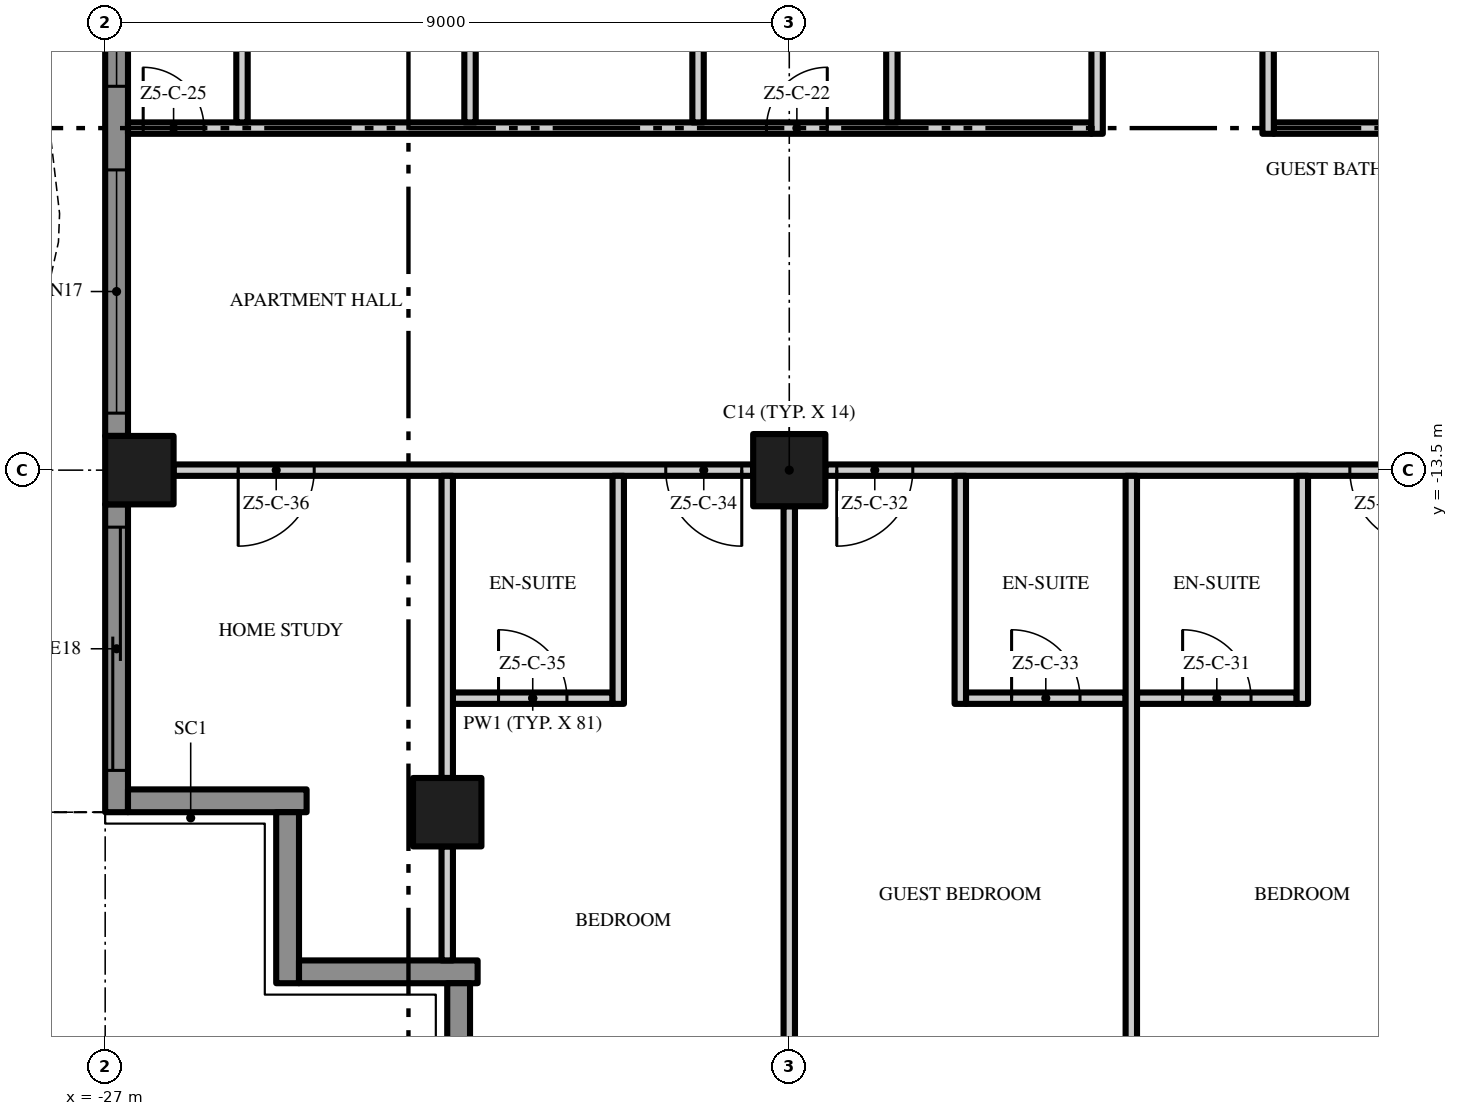
"""IFC4 building model, lengths in metres.
Left out: names, types, materials, properties, quantities, classifications, styles, units other than length and angle.
Written with IfcOpenShell. Run it as: python <this file> out.ifc"""

import sys

from ifc_helpers import new_model, si_unit, direction, frame, frame_2d, origin, origin_2d, place, context, subcontext, project, spatial, polyline, rectangle, outline, extrude, element, fill, save


model = new_model("IFC4")
c1 = context("Model", 3, precision=1e-05, world=origin(), true_north=direction((0.0, 1.0)))
c2 = subcontext(c1, "Body", "Model", "MODEL_VIEW")
j1 = project(units=[si_unit("LENGTHUNIT", "METRE"), si_unit("PLANEANGLEUNIT", "RADIAN")], contexts=[c1])
p1 = place(None, origin())
s1 = spatial("IfcSite", under=j1, at=p1, CompositionType="ELEMENT")
p2 = place(p1, origin())
s2 = spatial("IfcBuilding", under=s1, at=p2, CompositionType="ELEMENT")
p3 = place(p2, frame((0.0, 0.0, 269.2)))
s3 = spatial("IfcBuildingStorey", under=s2, at=p3, CompositionType="ELEMENT", Elevation=269.2)
p4 = place(p3, frame((-18.0, -13.5, 0.0), z_axis=(0.0, 0.0, 1.0), x_axis=(1.0, 0.0, 0.0)))
e1 = element("IfcColumn", 1, at=p4, inside=s3, PredefinedType="COLUMN", context=c2, shape_type="SweptSolid", body=[
    extrude(rectangle(XDim=0.95, YDim=0.95, at=origin_2d()), origin(), (0.0, 0.0, 1.0), 3.5),
])
for number, where, z_axis, x_axis in (
    (2, (-26.55, -13.5, 0.0), (0.0, 0.0, 1.0), (1.0, 0.0, 0.0)),
    (3, (-22.5, -18.0, 0.0), (0.0, 0.0, 1.0), (1.0, 0.0, 0.0)),
):
    element("IfcColumn", number, at=place(p3, frame(where, z_axis=z_axis, x_axis=x_axis)), inside=s3, PredefinedType="COLUMN", context=c2, shape_type="SweptSolid", body=[
        extrude(rectangle(XDim=0.9, YDim=0.9, at=origin_2d()), origin(), (0.0, 0.0, 1.0), 3.5),
    ])
p5 = place(p3, frame((-26.85, -13.05, 0.0), z_axis=(0.0, 0.0, 1.0), x_axis=(0.0, 1.0, 0.0)))
e4 = element("IfcWall", 4, at=p5, inside=s3, PredefinedType="SOLIDWALL", context=c2, shape_type="SweptSolid", body=[
    extrude(rectangle(XDim=8.1, YDim=0.3, at=frame_2d((4.05, 0.0))), origin(), (0.0, 0.0, 1.0), 3.5),
])
p6 = place(p5, frame((4.6, 0.0, 0.45)))
e5 = element("IfcOpeningElement", 5, at=p6, cuts=e4, PredefinedType="OPENING", context=c2, shape_type="SweptSolid", body=[
    extrude(rectangle(XDim=3.2, YDim=2.65, at=frame_2d((1.6, 1.325))), frame((0.0, 0.16, 0.0), z_axis=(0.0, -1.0, 0.0), x_axis=(1.0, 0.0, 0.0)), (0.0, 0.0, 1.0), 0.32),
])
p7 = place(p5, frame((0.3, 0.0, 0.45)))
e6 = element("IfcOpeningElement", 6, at=p7, cuts=e4, PredefinedType="OPENING", context=c2, shape_type="SweptSolid", body=[
    extrude(rectangle(XDim=3.2, YDim=2.65, at=frame_2d((1.6, 1.325))), frame((0.0, 0.16, 0.0), z_axis=(0.0, -1.0, 0.0), x_axis=(1.0, 0.0, 0.0)), (0.0, 0.0, 1.0), 0.32),
])
p8 = place(p3, frame((-26.85, -18.0, 0.0), z_axis=(0.0, 0.0, 1.0), x_axis=(0.0, 1.0, 0.0)))
e7 = element("IfcWall", 7, at=p8, inside=s3, PredefinedType="SOLIDWALL", context=c2, shape_type="SweptSolid", body=[
    extrude(rectangle(XDim=4.05, YDim=0.3, at=frame_2d((2.025, 0.0))), origin(), (0.0, 0.0, 1.0), 3.5),
])
p9 = place(p8, frame((0.55, 0.0, 0.0)))
e8 = element("IfcOpeningElement", 8, at=p9, cuts=e7, PredefinedType="OPENING", context=c2, shape_type="SweptSolid", body=[
    extrude(rectangle(XDim=3.2, YDim=2.4, at=frame_2d((1.6, 1.2))), frame((0.0, 0.16, 0.0), z_axis=(0.0, -1.0, 0.0), x_axis=(1.0, 0.0, 0.0)), (0.0, 0.0, 1.0), 0.32),
])
p10 = place(p3, frame((-24.35, -17.85, 0.0), z_axis=(0.0, 0.0, 1.0), x_axis=(-1.0, 0.0, 0.0)))
e9 = element("IfcWall", 9, at=p10, inside=s3, PredefinedType="SOLIDWALL", context=c2, shape_type="SweptSolid", body=[
    extrude(rectangle(XDim=2.35, YDim=0.3, at=frame_2d((1.175, 0.0))), origin(), (0.0, 0.0, 1.0), 3.5),
])
p11 = place(p3, frame((-24.6, -20.25, 0.0), z_axis=(0.0, 0.0, 1.0), x_axis=(0.0, 1.0, 0.0)))
e10 = element("IfcWall", 10, at=p11, inside=s3, PredefinedType="SOLIDWALL", context=c2, shape_type="SweptSolid", body=[
    extrude(rectangle(XDim=2.25, YDim=0.3, at=frame_2d((1.125, 0.0))), origin(), (0.0, 0.0, 1.0), 3.5),
])
p12 = place(p3, frame((-22.1, -20.1, 0.0), z_axis=(0.0, 0.0, 1.0), x_axis=(-1.0, 0.0, 0.0)))
e11 = element("IfcWall", 11, at=p12, inside=s3, PredefinedType="SOLIDWALL", context=c2, shape_type="SweptSolid", body=[
    extrude(rectangle(XDim=2.35, YDim=0.3, at=frame_2d((1.175, 0.0))), origin(), (0.0, 0.0, 1.0), 3.5),
])
p13 = place(p3, frame((-22.35, -22.5, 0.0), z_axis=(0.0, 0.0, 1.0), x_axis=(0.0, 1.0, 0.0)))
e12 = element("IfcWall", 12, at=p13, inside=s3, PredefinedType="SOLIDWALL", context=c2, shape_type="SweptSolid", body=[
    extrude(rectangle(XDim=2.25, YDim=0.3, at=frame_2d((1.125, 0.0))), origin(), (0.0, 0.0, 1.0), 3.5),
])
p14 = place(p3, origin())
e13 = element("IfcWall", 13, at=p14, inside=s3, PredefinedType="USERDEFINED", context=c2, shape_type="SweptSolid", body=[
    extrude(outline(polyline([(-27.951, 18.0), (-28.612, 16.5), (-29.345, 15.0), (-29.869, 13.5), (-30.0, 12.375), (-29.985, 12.0), (-29.649, 10.5), (-28.988, 9.0), (-28.255, 7.5), (-27.731, 6.0), (-27.6, 4.875), (-27.615, 4.5), (-27.951, 3.0), (-28.612, 1.5), (-29.345, 0.0), (-29.869, -1.5), (-30.0, -2.625), (-29.985, -3.0), (-29.649, -4.5), (-28.988, -6.0), (-28.255, -7.5), (-27.731, -9.0), (-27.6, -10.125), (-27.615, -10.5), (-27.951, -12.0), (-28.612, -13.5), (-29.345, -15.0), (-29.869, -16.5), (-30.0, -17.625), (-29.985, -18.0), (-29.735, -17.99), (-29.749, -17.635), (-29.624, -16.556), (-29.114, -15.096), (-28.385, -13.605), (-27.713, -12.079), (-27.366, -10.533), (-27.349, -10.115), (-27.486, -8.944), (-28.024, -7.404), (-28.761, -5.895), (-29.41, -4.421), (-29.736, -2.967), (-29.749, -2.635), (-29.624, -1.556), (-29.114, -0.096), (-28.385, 1.395), (-27.713, 2.921), (-27.366, 4.467), (-27.349, 4.885), (-27.486, 6.056), (-28.024, 7.596), (-28.761, 9.105), (-29.41, 10.579), (-29.736, 12.033), (-29.749, 12.365), (-29.624, 13.444), (-29.114, 14.904), (-28.385, 16.395), (-27.723, 17.899), (-27.951, 18.0)])), origin(), (0.0, 0.0, 1.0), 0.9),
])
p15 = place(p3, frame((-22.425, -16.5, 0.0), z_axis=(0.0, 0.0, 1.0), x_axis=(1.0, 0.0, 0.0)))
e14 = element("IfcWall", 14, at=p15, inside=s3, PredefinedType="PARTITIONING", context=c2, shape_type="SweptSolid", body=[
    extrude(rectangle(XDim=2.1, YDim=0.15, at=frame_2d((1.05, 0.0))), origin(), (0.0, 0.0, 1.0), 3.5),
])
p16 = place(p15, frame((0.6, 0.0, 0.0)))
e15 = element("IfcOpeningElement", 15, at=p16, cuts=e14, PredefinedType="OPENING", context=c2, shape_type="SweptSolid", body=[
    extrude(rectangle(XDim=0.9, YDim=2.1, at=frame_2d((0.45, 1.05))), frame((0.0, 0.085, 0.0), z_axis=(0.0, -1.0, 0.0), x_axis=(1.0, 0.0, 0.0)), (0.0, 0.0, 1.0), 0.17),
])
p17 = place(p3, frame((-15.675, -16.5, 0.0), z_axis=(0.0, 0.0, 1.0), x_axis=(1.0, 0.0, 0.0)))
e16 = element("IfcWall", 16, at=p17, inside=s3, PredefinedType="PARTITIONING", context=c2, shape_type="SweptSolid", body=[
    extrude(rectangle(XDim=2.1, YDim=0.15, at=frame_2d((1.05, 0.0))), origin(), (0.0, 0.0, 1.0), 3.5),
])
p18 = place(p17, frame((0.6, 0.0, 0.0)))
e17 = element("IfcOpeningElement", 17, at=p18, cuts=e16, PredefinedType="OPENING", context=c2, shape_type="SweptSolid", body=[
    extrude(rectangle(XDim=0.9, YDim=2.1, at=frame_2d((0.45, 1.05))), frame((0.0, 0.085, 0.0), z_axis=(0.0, -1.0, 0.0), x_axis=(1.0, 0.0, 0.0)), (0.0, 0.0, 1.0), 0.17),
])
p19 = place(p3, frame((-13.425, -16.5, 0.0), z_axis=(0.0, 0.0, 1.0), x_axis=(1.0, 0.0, 0.0)))
e18 = element("IfcWall", 18, at=p19, inside=s3, PredefinedType="PARTITIONING", context=c2, shape_type="SweptSolid", body=[
    extrude(rectangle(XDim=2.1, YDim=0.15, at=frame_2d((1.05, 0.0))), origin(), (0.0, 0.0, 1.0), 3.5),
])
p20 = place(p19, frame((0.6, 0.0, 0.0)))
e19 = element("IfcOpeningElement", 19, at=p20, cuts=e18, PredefinedType="OPENING", context=c2, shape_type="SweptSolid", body=[
    extrude(rectangle(XDim=0.9, YDim=2.1, at=frame_2d((0.45, 1.05))), frame((0.0, 0.085, 0.0), z_axis=(0.0, -1.0, 0.0), x_axis=(1.0, 0.0, 0.0)), (0.0, 0.0, 1.0), 0.17),
])
p21 = place(p3, frame((-18.475, -13.5, 0.0), z_axis=(0.0, 0.0, 1.0), x_axis=(-1.0, 0.0, 0.0)))
e20 = element("IfcWall", 20, at=p21, inside=s3, PredefinedType="PARTITIONING", context=c2, shape_type="SweptSolid", body=[
    extrude(rectangle(XDim=7.625, YDim=0.15, at=frame_2d((3.812, 0.0))), origin(), (0.0, 0.0, 1.0), 3.5),
])
p22 = place(p21, frame((0.15, 0.0, 0.0)))
e21 = element("IfcOpeningElement", 21, at=p22, cuts=e20, PredefinedType="OPENING", context=c2, shape_type="SweptSolid", body=[
    extrude(rectangle(XDim=1.0, YDim=2.4, at=frame_2d((0.5, 1.2))), frame((0.0, 0.085, 0.0), z_axis=(0.0, -1.0, 0.0), x_axis=(1.0, 0.0, 0.0)), (0.0, 0.0, 1.0), 0.17),
])
p23 = place(p21, frame((5.775, 0.0, 0.0)))
e22 = element("IfcOpeningElement", 22, at=p23, cuts=e20, PredefinedType="OPENING", context=c2, shape_type="SweptSolid", body=[
    extrude(rectangle(XDim=1.0, YDim=2.4, at=frame_2d((0.5, 1.2))), frame((0.0, 0.085, 0.0), z_axis=(0.0, -1.0, 0.0), x_axis=(1.0, 0.0, 0.0)), (0.0, 0.0, 1.0), 0.17),
])
p24 = place(p3, frame((-9.475, -13.5, 0.0), z_axis=(0.0, 0.0, 1.0), x_axis=(-1.0, 0.0, 0.0)))
e23 = element("IfcWall", 23, at=p24, inside=s3, PredefinedType="PARTITIONING", context=c2, shape_type="SweptSolid", body=[
    extrude(rectangle(XDim=8.05, YDim=0.15, at=frame_2d((4.025, 0.0))), origin(), (0.0, 0.0, 1.0), 3.5),
])
p25 = place(p24, frame((0.15, 0.0, 0.0)))
e24 = element("IfcOpeningElement", 24, at=p25, cuts=e23, PredefinedType="OPENING", context=c2, shape_type="SweptSolid", body=[
    extrude(rectangle(XDim=1.0, YDim=2.4, at=frame_2d((0.5, 1.2))), frame((0.0, 0.085, 0.0), z_axis=(0.0, -1.0, 0.0), x_axis=(1.0, 0.0, 0.0)), (0.0, 0.0, 1.0), 0.17),
])
p26 = place(p24, frame((6.9, 0.0, 0.0)))
e25 = element("IfcOpeningElement", 25, at=p26, cuts=e23, PredefinedType="OPENING", context=c2, shape_type="SweptSolid", body=[
    extrude(rectangle(XDim=1.0, YDim=2.4, at=frame_2d((0.5, 1.2))), frame((0.0, 0.085, 0.0), z_axis=(0.0, -1.0, 0.0), x_axis=(1.0, 0.0, 0.0)), (0.0, 0.0, 1.0), 0.17),
])
p27 = place(p3, frame((-26.7, -9.0, 0.0), z_axis=(0.0, 0.0, 1.0), x_axis=(1.0, 0.0, 0.0)))
e26 = element("IfcWall", 26, at=p27, inside=s3, PredefinedType="PARTITIONING", context=c2, shape_type="SweptSolid", body=[
    extrude(rectangle(XDim=12.675, YDim=0.15, at=frame_2d((6.338, 0.0))), origin(), (0.0, 0.0, 1.0), 3.5),
])
p28 = place(p27, frame((8.4, 0.0, 0.0)))
e27 = element("IfcOpeningElement", 27, at=p28, cuts=e26, PredefinedType="OPENING", context=c2, shape_type="SweptSolid", body=[
    extrude(rectangle(XDim=0.8, YDim=2.0, at=frame_2d((0.4, 1.0))), frame((0.0, 0.085, 0.0), z_axis=(0.0, -1.0, 0.0), x_axis=(1.0, 0.0, 0.0)), (0.0, 0.0, 1.0), 0.17),
])
p29 = place(p27, frame((0.2, 0.0, 0.0)))
e28 = element("IfcOpeningElement", 28, at=p29, cuts=e26, PredefinedType="OPENING", context=c2, shape_type="SweptSolid", body=[
    extrude(rectangle(XDim=0.8, YDim=2.0, at=frame_2d((0.4, 1.0))), frame((0.0, 0.085, 0.0), z_axis=(0.0, -1.0, 0.0), x_axis=(1.0, 0.0, 0.0)), (0.0, 0.0, 1.0), 0.17),
])
p30 = place(p3, frame((-11.625, -9.0, 0.0), z_axis=(0.0, 0.0, 1.0), x_axis=(1.0, 0.0, 0.0)))
e29 = element("IfcWall", 29, at=p30, inside=s3, PredefinedType="PARTITIONING", context=c2, shape_type="SweptSolid", body=[
    extrude(rectangle(XDim=16.025, YDim=0.15, at=frame_2d((8.012, 0.0))), origin(), (0.0, 0.0, 1.0), 3.5),
])
p31 = place(p30, frame((4.675, 0.0, 0.0)))
e30 = element("IfcOpeningElement", 30, at=p31, cuts=e29, PredefinedType="OPENING", context=c2, shape_type="SweptSolid", body=[
    extrude(rectangle(XDim=1.0, YDim=2.4, at=frame_2d((0.5, 1.2))), frame((0.0, 0.085, 0.0), z_axis=(0.0, -1.0, 0.0), x_axis=(1.0, 0.0, 0.0)), (0.0, 0.0, 1.0), 0.17),
])
p32 = place(p3, frame((-25.2, -8.925, 0.0), z_axis=(0.0, 0.0, 1.0), x_axis=(0.0, 1.0, 0.0)))
e31 = element("IfcWall", 31, at=p32, inside=s3, PredefinedType="PARTITIONING", context=c2, shape_type="SweptSolid", body=[
    extrude(rectangle(XDim=4.35, YDim=0.15, at=frame_2d((2.175, 0.0))), origin(), (0.0, 0.0, 1.0), 3.5),
])
p33 = place(p3, frame((-22.5, -19.95, 0.0), z_axis=(0.0, 0.0, 1.0), x_axis=(0.0, 1.0, 0.0)))
e32 = element("IfcWall", 32, at=p33, inside=s3, PredefinedType="PARTITIONING", context=c2, shape_type="SweptSolid", body=[
    extrude(rectangle(XDim=1.5, YDim=0.15, at=frame_2d((0.75, 0.0))), origin(), (0.0, 0.0, 1.0), 3.5),
])
p34 = place(p3, frame((-22.5, -17.55, 0.0), z_axis=(0.0, 0.0, 1.0), x_axis=(0.0, 1.0, 0.0)))
e33 = element("IfcWall", 33, at=p34, inside=s3, PredefinedType="PARTITIONING", context=c2, shape_type="SweptSolid", body=[
    extrude(rectangle(XDim=3.975, YDim=0.15, at=frame_2d((1.988, 0.0))), origin(), (0.0, 0.0, 1.0), 3.5),
])
p35 = place(p3, frame((-22.2, -8.925, 0.0), z_axis=(0.0, 0.0, 1.0), x_axis=(0.0, 1.0, 0.0)))
e34 = element("IfcWall", 34, at=p35, inside=s3, PredefinedType="PARTITIONING", context=c2, shape_type="SweptSolid", body=[
    extrude(rectangle(XDim=4.35, YDim=0.15, at=frame_2d((2.175, 0.0))), origin(), (0.0, 0.0, 1.0), 3.5),
])
p36 = place(p3, frame((-20.25, -16.575, 0.0), z_axis=(0.0, 0.0, 1.0), x_axis=(0.0, 1.0, 0.0)))
e35 = element("IfcWall", 35, at=p36, inside=s3, PredefinedType="PARTITIONING", context=c2, shape_type="SweptSolid", body=[
    extrude(rectangle(XDim=3.0, YDim=0.15, at=frame_2d((1.5, 0.0))), origin(), (0.0, 0.0, 1.0), 3.5),
])
p37 = place(p3, frame((-19.2, -8.925, 0.0), z_axis=(0.0, 0.0, 1.0), x_axis=(0.0, 1.0, 0.0)))
e36 = element("IfcWall", 36, at=p37, inside=s3, PredefinedType="PARTITIONING", context=c2, shape_type="SweptSolid", body=[
    extrude(rectangle(XDim=4.35, YDim=0.15, at=frame_2d((2.175, 0.0))), origin(), (0.0, 0.0, 1.0), 3.5),
])
p38 = place(p3, frame((-18.0, -21.6, 0.0), z_axis=(0.0, 0.0, 1.0), x_axis=(0.0, 1.0, 0.0)))
e37 = element("IfcWall", 37, at=p38, inside=s3, PredefinedType="PARTITIONING", context=c2, shape_type="SweptSolid", body=[
    extrude(rectangle(XDim=7.625, YDim=0.15, at=frame_2d((3.812, 0.0))), origin(), (0.0, 0.0, 1.0), 3.5),
])
p39 = place(p3, frame((-16.65, -8.925, 0.0), z_axis=(0.0, 0.0, 1.0), x_axis=(0.0, 1.0, 0.0)))
e38 = element("IfcWall", 38, at=p39, inside=s3, PredefinedType="PARTITIONING", context=c2, shape_type="SweptSolid", body=[
    extrude(rectangle(XDim=4.35, YDim=0.15, at=frame_2d((2.175, 0.0))), origin(), (0.0, 0.0, 1.0), 3.5),
])
p40 = place(p3, frame((-15.75, -16.575, 0.0), z_axis=(0.0, 0.0, 1.0), x_axis=(0.0, 1.0, 0.0)))
e39 = element("IfcWall", 39, at=p40, inside=s3, PredefinedType="PARTITIONING", context=c2, shape_type="SweptSolid", body=[
    extrude(rectangle(XDim=3.0, YDim=0.15, at=frame_2d((1.5, 0.0))), origin(), (0.0, 0.0, 1.0), 3.5),
])
p41 = place(p3, frame((-13.95, -9.075, 0.0), z_axis=(0.0, 0.0, 1.0), x_axis=(0.0, 1.0, 0.0)))
e40 = element("IfcWall", 40, at=p41, inside=s3, PredefinedType="PARTITIONING", context=c2, shape_type="SweptSolid", body=[
    extrude(rectangle(XDim=4.65, YDim=0.15, at=frame_2d((2.325, 0.0))), origin(), (0.0, 0.0, 1.0), 3.5),
])
p42 = place(p3, frame((-13.5, -22.2, 0.0), z_axis=(0.0, 0.0, 1.0), x_axis=(0.0, 1.0, 0.0)))
e41 = element("IfcWall", 41, at=p42, inside=s3, PredefinedType="PARTITIONING", context=c2, shape_type="SweptSolid", body=[
    extrude(rectangle(XDim=8.625, YDim=0.15, at=frame_2d((4.312, 0.0))), origin(), (0.0, 0.0, 1.0), 3.5),
])
p43 = place(p3, frame((-11.7, -4.425, 0.0), z_axis=(0.0, 0.0, 1.0), x_axis=(0.0, -1.0, 0.0)))
e42 = element("IfcWall", 42, at=p43, inside=s3, PredefinedType="PARTITIONING", context=c2, shape_type="SweptSolid", body=[
    extrude(rectangle(XDim=4.65, YDim=0.15, at=frame_2d((2.325, 0.0))), origin(), (0.0, 0.0, 1.0), 3.5),
])
p44 = place(p43, frame((1.875, 0.0, 0.0)))
e43 = element("IfcOpeningElement", 43, at=p44, cuts=e42, PredefinedType="OPENING", context=c2, shape_type="SweptSolid", body=[
    extrude(rectangle(XDim=0.9, YDim=2.1, at=frame_2d((0.45, 1.05))), frame((0.0, 0.085, 0.0), z_axis=(0.0, -1.0, 0.0), x_axis=(1.0, 0.0, 0.0)), (0.0, 0.0, 1.0), 0.17),
])
p45 = place(p3, frame((-11.25, -16.575, 0.0), z_axis=(0.0, 0.0, 1.0), x_axis=(0.0, 1.0, 0.0)))
e44 = element("IfcWall", 44, at=p45, inside=s3, PredefinedType="PARTITIONING", context=c2, shape_type="SweptSolid", body=[
    extrude(rectangle(XDim=3.0, YDim=0.15, at=frame_2d((1.5, 0.0))), origin(), (0.0, 0.0, 1.0), 3.5),
])
p46 = place(p6, origin())
e45 = element("IfcWindow", 45, at=p46, inside=s3, PartitioningType="SINGLE_PANEL", PredefinedType="WINDOW", context=c2, shape_type="SweptSolid", body=[
    extrude(rectangle(XDim=3.2, YDim=2.65, at=frame_2d((1.6, 1.325))), frame((0.0, 0.03, 0.0), z_axis=(0.0, -1.0, 0.0), x_axis=(1.0, 0.0, 0.0)), (0.0, 0.0, 1.0), 0.06),
])
fill(e5, e45)
p47 = place(p7, origin())
e46 = element("IfcWindow", 46, at=p47, inside=s3, PartitioningType="SINGLE_PANEL", PredefinedType="WINDOW", context=c2, shape_type="SweptSolid", body=[
    extrude(rectangle(XDim=3.2, YDim=2.65, at=frame_2d((1.6, 1.325))), frame((0.0, 0.03, 0.0), z_axis=(0.0, -1.0, 0.0), x_axis=(1.0, 0.0, 0.0)), (0.0, 0.0, 1.0), 0.06),
])
fill(e6, e46)
p48 = place(p9, origin())
e47 = element("IfcDoor", 47, at=p48, inside=s3, OperationType="SINGLE_SWING_LEFT", PredefinedType="DOOR", context=c2, shape_type="SweptSolid", body=[
    extrude(rectangle(XDim=3.2, YDim=2.4, at=frame_2d((1.6, 1.2))), frame((0.0, 0.025, 0.0), z_axis=(0.0, -1.0, 0.0), x_axis=(1.0, 0.0, 0.0)), (0.0, 0.0, 1.0), 0.05),
])
fill(e8, e47)
p49 = place(p28, origin())
e48 = element("IfcDoor", 48, at=p49, inside=s3, OperationType="SINGLE_SWING_RIGHT", PredefinedType="DOOR", context=c2, shape_type="SweptSolid", body=[
    extrude(rectangle(XDim=0.8, YDim=2.0, at=frame_2d((0.4, 1.0))), frame((0.0, 0.025, 0.0), z_axis=(0.0, -1.0, 0.0), x_axis=(1.0, 0.0, 0.0)), (0.0, 0.0, 1.0), 0.05),
])
fill(e27, e48)
p50 = place(p29, origin())
e49 = element("IfcDoor", 49, at=p50, inside=s3, OperationType="SINGLE_SWING_LEFT", PredefinedType="DOOR", context=c2, shape_type="SweptSolid", body=[
    extrude(rectangle(XDim=0.8, YDim=2.0, at=frame_2d((0.4, 1.0))), frame((0.0, 0.025, 0.0), z_axis=(0.0, -1.0, 0.0), x_axis=(1.0, 0.0, 0.0)), (0.0, 0.0, 1.0), 0.05),
])
fill(e28, e49)
p51 = place(p25, origin())
e50 = element("IfcDoor", 50, at=p51, inside=s3, OperationType="SINGLE_SWING_LEFT", PredefinedType="DOOR", context=c2, shape_type="SweptSolid", body=[
    extrude(rectangle(XDim=1.0, YDim=2.4, at=frame_2d((0.5, 1.2))), frame((0.0, 0.025, 0.0), z_axis=(0.0, -1.0, 0.0), x_axis=(1.0, 0.0, 0.0)), (0.0, 0.0, 1.0), 0.05),
])
fill(e24, e50)
p52 = place(p20, origin())
e51 = element("IfcDoor", 51, at=p52, inside=s3, OperationType="SINGLE_SWING_LEFT", PredefinedType="DOOR", context=c2, shape_type="SweptSolid", body=[
    extrude(rectangle(XDim=0.9, YDim=2.1, at=frame_2d((0.45, 1.05))), frame((0.0, 0.025, 0.0), z_axis=(0.0, -1.0, 0.0), x_axis=(1.0, 0.0, 0.0)), (0.0, 0.0, 1.0), 0.05),
])
fill(e19, e51)
p53 = place(p26, origin())
e52 = element("IfcDoor", 52, at=p53, inside=s3, OperationType="SINGLE_SWING_RIGHT", PredefinedType="DOOR", context=c2, shape_type="SweptSolid", body=[
    extrude(rectangle(XDim=1.0, YDim=2.4, at=frame_2d((0.5, 1.2))), frame((0.0, 0.025, 0.0), z_axis=(0.0, -1.0, 0.0), x_axis=(1.0, 0.0, 0.0)), (0.0, 0.0, 1.0), 0.05),
])
fill(e25, e52)
p54 = place(p18, origin())
e53 = element("IfcDoor", 53, at=p54, inside=s3, OperationType="SINGLE_SWING_LEFT", PredefinedType="DOOR", context=c2, shape_type="SweptSolid", body=[
    extrude(rectangle(XDim=0.9, YDim=2.1, at=frame_2d((0.45, 1.05))), frame((0.0, 0.025, 0.0), z_axis=(0.0, -1.0, 0.0), x_axis=(1.0, 0.0, 0.0)), (0.0, 0.0, 1.0), 0.05),
])
fill(e17, e53)
p55 = place(p22, origin())
e54 = element("IfcDoor", 54, at=p55, inside=s3, OperationType="SINGLE_SWING_LEFT", PredefinedType="DOOR", context=c2, shape_type="SweptSolid", body=[
    extrude(rectangle(XDim=1.0, YDim=2.4, at=frame_2d((0.5, 1.2))), frame((0.0, 0.025, 0.0), z_axis=(0.0, -1.0, 0.0), x_axis=(1.0, 0.0, 0.0)), (0.0, 0.0, 1.0), 0.05),
])
fill(e21, e54)
p56 = place(p16, origin())
e55 = element("IfcDoor", 55, at=p56, inside=s3, OperationType="SINGLE_SWING_LEFT", PredefinedType="DOOR", context=c2, shape_type="SweptSolid", body=[
    extrude(rectangle(XDim=0.9, YDim=2.1, at=frame_2d((0.45, 1.05))), frame((0.0, 0.025, 0.0), z_axis=(0.0, -1.0, 0.0), x_axis=(1.0, 0.0, 0.0)), (0.0, 0.0, 1.0), 0.05),
])
fill(e15, e55)
p57 = place(p23, origin())
e56 = element("IfcDoor", 56, at=p57, inside=s3, OperationType="SINGLE_SWING_RIGHT", PredefinedType="DOOR", context=c2, shape_type="SweptSolid", body=[
    extrude(rectangle(XDim=1.0, YDim=2.4, at=frame_2d((0.5, 1.2))), frame((0.0, 0.025, 0.0), z_axis=(0.0, -1.0, 0.0), x_axis=(1.0, 0.0, 0.0)), (0.0, 0.0, 1.0), 0.05),
])
fill(e22, e56)
save(model, sys.argv[1])
